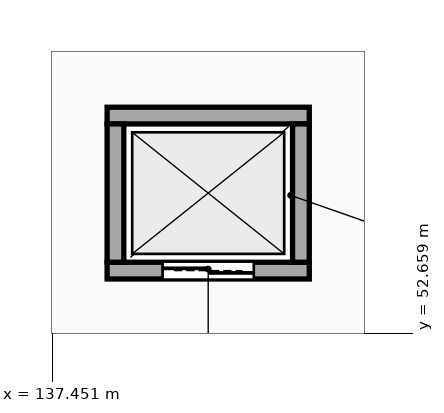
"""IFC4 building model, lengths in metres.
Left out: names, types, materials, properties, quantities, classifications, styles, units other than length and angle.
Written with IfcOpenShell. Run it as: python <this file> out.ifc"""

import sys

from ifc_helpers import new_model, si_unit, direction, frame, frame_2d, origin, place, context, subcontext, project, spatial, rectangle, extrude, element, fill, save


model = new_model("IFC4")
c1 = context("Model", 3, precision=1e-05, world=origin(), true_north=direction((0.0, 1.0)))
c2 = subcontext(c1, "Body", "Model", "MODEL_VIEW")
j1 = project(units=[si_unit("LENGTHUNIT", "METRE"), si_unit("PLANEANGLEUNIT", "RADIAN")], contexts=[c1])
p1 = place(None, origin())
s1 = spatial("IfcSite", under=j1, at=p1, CompositionType="ELEMENT")
p2 = place(p1, origin())
s2 = spatial("IfcBuilding", under=s1, at=p2, CompositionType="ELEMENT")
p3 = place(p2, origin())
s3 = spatial("IfcBuildingStorey", under=s2, at=p3, CompositionType="ELEMENT", Elevation=0.0)
p4 = place(p3, frame((138.17, 53.48, 0.0), z_axis=(0.0, 0.0, 1.0), x_axis=(1.0, 0.0, 0.0)))
e1 = element("IfcWall", 1, at=p4, inside=s3, PredefinedType="STANDARD", context=c2, shape_type="SweptSolid", body=[
    extrude(rectangle(XDim=2.66, YDim=0.22, at=frame_2d((1.33, 0.0))), origin(), (0.0, 0.0, 1.0), 5.08),
])
p5 = place(p4, frame((0.73, 0.0, 0.0)))
e2 = element("IfcOpeningElement", 2, at=p5, cuts=e1, PredefinedType="OPENING", context=c2, shape_type="SweptSolid", body=[
    extrude(rectangle(XDim=1.2, YDim=2.2, at=frame_2d((0.6, 1.1))), frame((0.0, 0.12, 0.0), z_axis=(0.0, -1.0, 0.0), x_axis=(1.0, 0.0, 0.0)), (0.0, 0.0, 1.0), 0.24),
])
p6 = place(p3, frame((140.83, 55.52, 0.0), z_axis=(0.0, 0.0, 1.0), x_axis=(-1.0, 0.0, 0.0)))
e3 = element("IfcWall", 3, at=p6, inside=s3, PredefinedType="STANDARD", context=c2, shape_type="SweptSolid", body=[
    extrude(rectangle(XDim=2.66, YDim=0.22, at=frame_2d((1.33, 0.0))), origin(), (0.0, 0.0, 1.0), 5.08),
])
for number, where, z_axis, x_axis in (
    (4, (138.28, 55.41, 0.0), (0.0, 0.0, 1.0), (0.0, -1.0, 0.0)),
    (5, (140.72, 53.59, 0.0), (0.0, 0.0, 1.0), (0.0, 1.0, 0.0)),
):
    element("IfcWall", number, at=place(p3, frame(where, z_axis=z_axis, x_axis=x_axis)), inside=s3, PredefinedType="STANDARD", context=c2, shape_type="SweptSolid", body=[
        extrude(rectangle(XDim=1.82, YDim=0.22, at=frame_2d((0.91, 0.0))), origin(), (0.0, 0.0, 1.0), 5.08),
    ])
p7 = place(p5, origin())
e6 = element("IfcDoor", 6, at=p7, inside=s3, OperationType="DOUBLE_DOOR_SLIDING", PredefinedType="DOOR", context=c2, shape_type="SweptSolid", body=[
    extrude(rectangle(XDim=1.2, YDim=2.2, at=frame_2d((0.6, 1.1))), frame((0.0, 0.025, 0.0), z_axis=(0.0, -1.0, 0.0), x_axis=(1.0, 0.0, 0.0)), (0.0, 0.0, 1.0), 0.05),
])
fill(e2, e6)
save(model, sys.argv[1])
